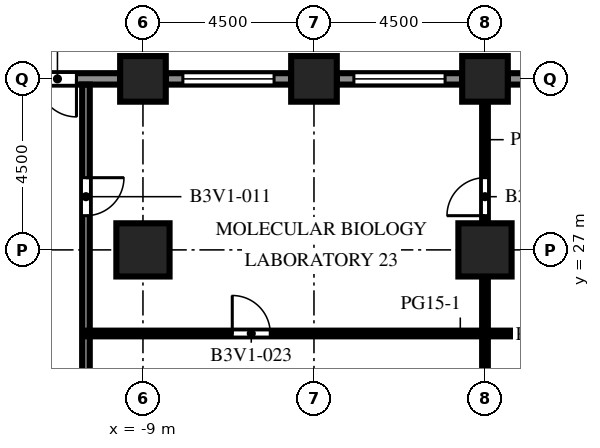
"""IFC4 building model, lengths in metres.
Left out: names, types, materials, properties, quantities, classifications, styles, units other than length and angle.
Written with IfcOpenShell. Run it as: python <this file> out.ifc"""

import sys

from ifc_helpers import new_model, si_unit, direction, frame, frame_2d, origin, origin_2d, place, context, subcontext, project, spatial, rectangle, extrude, element, fill, save


model = new_model("IFC4")
c1 = context("Model", 3, precision=1e-05, world=origin(), true_north=direction((0.0, 1.0)))
c2 = subcontext(c1, "Body", "Model", "MODEL_VIEW")
j1 = project(units=[si_unit("LENGTHUNIT", "METRE"), si_unit("PLANEANGLEUNIT", "RADIAN")], contexts=[c1])
p1 = place(None, origin())
s1 = spatial("IfcSite", under=j1, at=p1, CompositionType="ELEMENT")
p2 = place(p1, origin())
s2 = spatial("IfcBuilding", under=s1, at=p2, CompositionType="ELEMENT")
p3 = place(p2, frame((0.0, 0.0, 86.1)))
s3 = spatial("IfcBuildingStorey", under=s2, at=p3, CompositionType="ELEMENT", Elevation=86.1)
for number, where, z_axis, x_axis in (
    (1, (-9.0, 31.5, 0.0), (0.0, 0.0, 1.0), (1.0, 0.0, 0.0)),
    (2, (-4.5, 31.5, 0.0), (0.0, 0.0, 1.0), (1.0, 0.0, 0.0)),
    (3, (0.0, 31.5, 0.0), (0.0, 0.0, 1.0), (1.0, 0.0, 0.0)),
):
    element("IfcColumn", number, at=place(p3, frame(where, z_axis=z_axis, x_axis=x_axis)), inside=s3, PredefinedType="COLUMN", context=c2, shape_type="SweptSolid", body=[
        extrude(rectangle(XDim=1.2, YDim=1.2, at=origin_2d()), origin(), (0.0, 0.0, 1.0), 4.1),
    ])
for number, where, z_axis, x_axis in (
    (4, (-9.0, 27.0, 0.0), (0.0, 0.0, 1.0), (1.0, 0.0, 0.0)),
    (5, (0.0, 27.0, 0.0), (0.0, 0.0, 1.0), (1.0, 0.0, 0.0)),
):
    element("IfcColumn", number, at=place(p3, frame(where, z_axis=z_axis, x_axis=x_axis)), inside=s3, PredefinedType="COLUMN", context=c2, shape_type="SweptSolid", body=[
        extrude(rectangle(XDim=1.4, YDim=1.4, at=origin_2d()), origin(), (0.0, 0.0, 1.0), 4.1),
    ])
p4 = place(p3, frame((0.6, 31.5, 0.0), z_axis=(0.0, 0.0, 1.0), x_axis=(1.0, 0.0, 0.0)))
e6 = element("IfcWall", 6, at=p4, inside=s3, PredefinedType="SOLIDWALL", context=c2, shape_type="SweptSolid", body=[
    extrude(rectangle(XDim=3.3, YDim=0.3, at=frame_2d((1.65, 0.0))), origin(), (0.0, 0.0, 1.0), 2.75),
])
p5 = place(p4, frame((0.45, 0.0, 0.8)))
e7 = element("IfcOpeningElement", 7, at=p5, cuts=e6, PredefinedType="OPENING", context=c2, shape_type="SweptSolid", body=[
    extrude(rectangle(XDim=2.4, YDim=1.7, at=frame_2d((1.2, 0.85))), frame((0.0, 0.16, 0.0), z_axis=(0.0, -1.0, 0.0), x_axis=(1.0, 0.0, 0.0)), (0.0, 0.0, 1.0), 0.32),
])
p6 = place(p3, frame((-3.9, 31.5, 0.0), z_axis=(0.0, 0.0, 1.0), x_axis=(1.0, 0.0, 0.0)))
e8 = element("IfcWall", 8, at=p6, inside=s3, PredefinedType="SOLIDWALL", context=c2, shape_type="SweptSolid", body=[
    extrude(rectangle(XDim=3.3, YDim=0.3, at=frame_2d((1.65, 0.0))), origin(), (0.0, 0.0, 1.0), 2.75),
])
p7 = place(p6, frame((0.45, 0.0, 0.8)))
e9 = element("IfcOpeningElement", 9, at=p7, cuts=e8, PredefinedType="OPENING", context=c2, shape_type="SweptSolid", body=[
    extrude(rectangle(XDim=2.4, YDim=1.7, at=frame_2d((1.2, 0.85))), frame((0.0, 0.16, 0.0), z_axis=(0.0, -1.0, 0.0), x_axis=(1.0, 0.0, 0.0)), (0.0, 0.0, 1.0), 0.32),
])
p8 = place(p3, frame((-8.4, 31.5, 0.0), z_axis=(0.0, 0.0, 1.0), x_axis=(1.0, 0.0, 0.0)))
e10 = element("IfcWall", 10, at=p8, inside=s3, PredefinedType="SOLIDWALL", context=c2, shape_type="SweptSolid", body=[
    extrude(rectangle(XDim=3.3, YDim=0.3, at=frame_2d((1.65, 0.0))), origin(), (0.0, 0.0, 1.0), 2.75),
])
p9 = place(p8, frame((0.45, 0.0, 0.8)))
e11 = element("IfcOpeningElement", 11, at=p9, cuts=e10, PredefinedType="OPENING", context=c2, shape_type="SweptSolid", body=[
    extrude(rectangle(XDim=2.4, YDim=1.7, at=frame_2d((1.2, 0.85))), frame((0.0, 0.16, 0.0), z_axis=(0.0, -1.0, 0.0), x_axis=(1.0, 0.0, 0.0)), (0.0, 0.0, 1.0), 0.32),
])
p10 = place(p3, frame((-12.9, 31.5, 0.0), z_axis=(0.0, 0.0, 1.0), x_axis=(1.0, 0.0, 0.0)))
e12 = element("IfcWall", 12, at=p10, inside=s3, PredefinedType="SOLIDWALL", context=c2, shape_type="SweptSolid", body=[
    extrude(rectangle(XDim=3.3, YDim=0.3, at=frame_2d((1.65, 0.0))), origin(), (0.0, 0.0, 1.0), 2.75),
])
p11 = place(p10, frame((1.15, 0.0, 0.0)))
e13 = element("IfcOpeningElement", 13, at=p11, cuts=e12, PredefinedType="OPENING", context=c2, shape_type="SweptSolid", body=[
    extrude(rectangle(XDim=1.0, YDim=2.2, at=frame_2d((0.5, 1.1))), frame((0.0, 0.16, 0.0), z_axis=(0.0, -1.0, 0.0), x_axis=(1.0, 0.0, 0.0)), (0.0, 0.0, 1.0), 0.32),
])
p12 = place(p3, frame((-10.5, 31.35, 0.0), z_axis=(0.0, 0.0, 1.0), x_axis=(0.0, -1.0, 0.0)))
e14 = element("IfcWall", 14, at=p12, inside=s3, PredefinedType="PARTITIONING", context=c2, shape_type="SweptSolid", body=[
    extrude(rectangle(XDim=12.85, YDim=0.2, at=frame_2d((6.425, 0.0))), origin(), (0.0, 0.0, 1.0), 3.65),
])
p13 = place(p12, frame((2.45, 0.0, 0.0)))
e15 = element("IfcOpeningElement", 15, at=p13, cuts=e14, PredefinedType="OPENING", context=c2, shape_type="SweptSolid", body=[
    extrude(rectangle(XDim=1.0, YDim=2.1, at=frame_2d((0.5, 1.05))), frame((0.0, 0.11, 0.0), z_axis=(0.0, -1.0, 0.0), x_axis=(1.0, 0.0, 0.0)), (0.0, 0.0, 1.0), 0.22),
])
p14 = place(p3, frame((0.0, 23.2, 0.0), z_axis=(0.0, 0.0, 1.0), x_axis=(0.0, 1.0, 0.0)))
e16 = element("IfcWall", 16, at=p14, inside=s3, PredefinedType="PARTITIONING", context=c2, shape_type="SweptSolid", body=[
    extrude(rectangle(XDim=3.1, YDim=0.15, at=frame_2d((1.55, 0.0))), origin(), (0.0, 0.0, 1.0), 3.65),
])
p15 = place(p3, frame((0.0, 30.9, 0.0), z_axis=(0.0, 0.0, 1.0), x_axis=(0.0, -1.0, 0.0)))
e17 = element("IfcWall", 17, at=p15, inside=s3, PredefinedType="PARTITIONING", context=c2, shape_type="SweptSolid", body=[
    extrude(rectangle(XDim=3.2, YDim=0.15, at=frame_2d((1.6, 0.0))), origin(), (0.0, 0.0, 1.0), 3.65),
])
p16 = place(p15, frame((2.0, 0.0, 0.0)))
e18 = element("IfcOpeningElement", 18, at=p16, cuts=e17, PredefinedType="OPENING", context=c2, shape_type="SweptSolid", body=[
    extrude(rectangle(XDim=1.0, YDim=2.1, at=frame_2d((0.5, 1.05))), frame((0.0, 0.085, 0.0), z_axis=(0.0, -1.0, 0.0), x_axis=(1.0, 0.0, 0.0)), (0.0, 0.0, 1.0), 0.17),
])
p17 = place(p3, frame((18.0, 24.8, 0.0), z_axis=(0.0, 0.0, 1.0), x_axis=(-1.0, 0.0, 0.0)))
e19 = element("IfcWall", 19, at=p17, inside=s3, PredefinedType="PARTITIONING", context=c2, shape_type="SweptSolid", body=[
    extrude(rectangle(XDim=28.5, YDim=0.15, at=frame_2d((14.25, 0.0))), origin(), (0.0, 0.0, 1.0), 3.65),
])
p18 = place(p17, frame((23.65, 0.0, 0.0)))
e20 = element("IfcOpeningElement", 20, at=p18, cuts=e19, PredefinedType="OPENING", context=c2, shape_type="SweptSolid", body=[
    extrude(rectangle(XDim=1.0, YDim=2.1, at=frame_2d((0.5, 1.05))), frame((0.0, 0.085, 0.0), z_axis=(0.0, -1.0, 0.0), x_axis=(1.0, 0.0, 0.0)), (0.0, 0.0, 1.0), 0.17),
])
p19 = place(p17, frame((12.65, 0.0, 0.0)))
e21 = element("IfcOpeningElement", 21, at=p19, cuts=e19, PredefinedType="OPENING", context=c2, shape_type="SweptSolid", body=[
    extrude(rectangle(XDim=1.0, YDim=2.1, at=frame_2d((0.5, 1.05))), frame((0.0, 0.085, 0.0), z_axis=(0.0, -1.0, 0.0), x_axis=(1.0, 0.0, 0.0)), (0.0, 0.0, 1.0), 0.17),
])
p20 = place(p17, frame((1.9, 0.0, 0.0)))
e22 = element("IfcOpeningElement", 22, at=p20, cuts=e19, PredefinedType="OPENING", context=c2, shape_type="SweptSolid", body=[
    extrude(rectangle(XDim=1.0, YDim=2.1, at=frame_2d((0.5, 1.05))), frame((0.0, 0.085, 0.0), z_axis=(0.0, -1.0, 0.0), x_axis=(1.0, 0.0, 0.0)), (0.0, 0.0, 1.0), 0.17),
])
p21 = place(p7, origin())
e23 = element("IfcWindow", 23, at=p21, inside=s3, PartitioningType="SINGLE_PANEL", PredefinedType="WINDOW", context=c2, shape_type="SweptSolid", body=[
    extrude(rectangle(XDim=2.4, YDim=1.7, at=frame_2d((1.2, 0.85))), frame((0.0, 0.03, 0.0), z_axis=(0.0, -1.0, 0.0), x_axis=(1.0, 0.0, 0.0)), (0.0, 0.0, 1.0), 0.06),
])
fill(e9, e23)
p22 = place(p9, origin())
e24 = element("IfcWindow", 24, at=p22, inside=s3, PartitioningType="SINGLE_PANEL", PredefinedType="WINDOW", context=c2, shape_type="SweptSolid", body=[
    extrude(rectangle(XDim=2.4, YDim=1.7, at=frame_2d((1.2, 0.85))), frame((0.0, 0.03, 0.0), z_axis=(0.0, -1.0, 0.0), x_axis=(1.0, 0.0, 0.0)), (0.0, 0.0, 1.0), 0.06),
])
fill(e11, e24)
p23 = place(p11, origin())
e25 = element("IfcDoor", 25, at=p23, inside=s3, OperationType="SINGLE_SWING_RIGHT", PredefinedType="DOOR", context=c2, shape_type="SweptSolid", body=[
    extrude(rectangle(XDim=1.0, YDim=2.2, at=frame_2d((0.5, 1.1))), frame((0.0, 0.025, 0.0), z_axis=(0.0, -1.0, 0.0), x_axis=(1.0, 0.0, 0.0)), (0.0, 0.0, 1.0), 0.05),
])
fill(e13, e25)
p24 = place(p13, origin())
e26 = element("IfcDoor", 26, at=p24, inside=s3, OperationType="SINGLE_SWING_LEFT", PredefinedType="DOOR", context=c2, shape_type="SweptSolid", body=[
    extrude(rectangle(XDim=1.0, YDim=2.1, at=frame_2d((0.5, 1.05))), frame((0.0, 0.025, 0.0), z_axis=(0.0, -1.0, 0.0), x_axis=(1.0, 0.0, 0.0)), (0.0, 0.0, 1.0), 0.05),
])
fill(e15, e26)
p25 = place(p16, origin())
e27 = element("IfcDoor", 27, at=p25, inside=s3, OperationType="SINGLE_SWING_RIGHT", PredefinedType="DOOR", context=c2, shape_type="SweptSolid", body=[
    extrude(rectangle(XDim=1.0, YDim=2.1, at=frame_2d((0.5, 1.05))), frame((0.0, 0.025, 0.0), z_axis=(0.0, -1.0, 0.0), x_axis=(1.0, 0.0, 0.0)), (0.0, 0.0, 1.0), 0.05),
])
fill(e18, e27)
p26 = place(p18, origin())
e28 = element("IfcDoor", 28, at=p26, inside=s3, OperationType="SINGLE_SWING_RIGHT", PredefinedType="DOOR", context=c2, shape_type="SweptSolid", body=[
    extrude(rectangle(XDim=1.0, YDim=2.1, at=frame_2d((0.5, 1.05))), frame((0.0, 0.025, 0.0), z_axis=(0.0, -1.0, 0.0), x_axis=(1.0, 0.0, 0.0)), (0.0, 0.0, 1.0), 0.05),
])
fill(e20, e28)
save(model, sys.argv[1])
